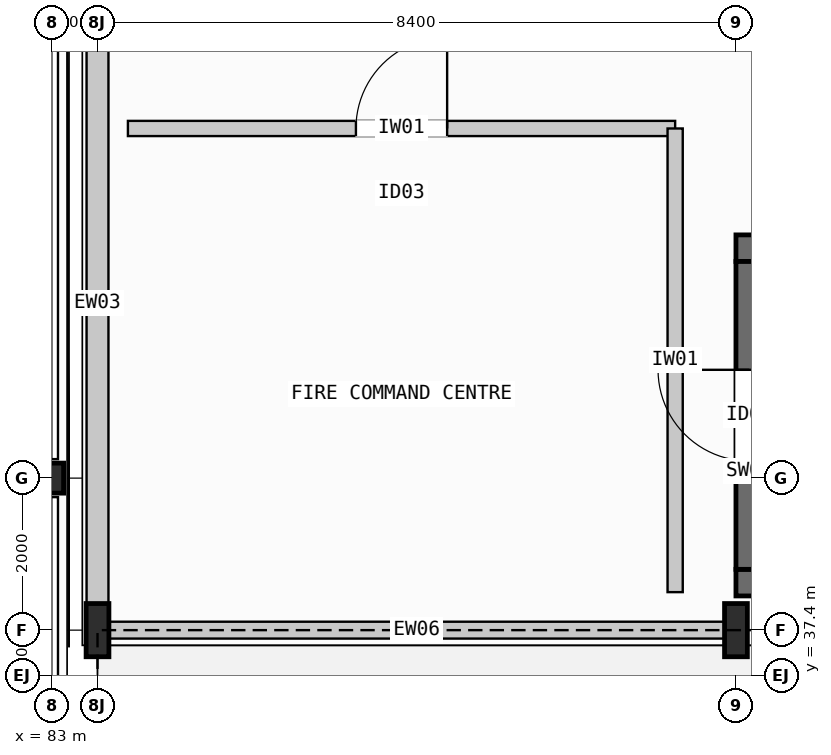
"""IFC4 building model, lengths in metres.
Left out: names, types, materials, properties, quantities, classifications, styles, units other than length and angle.
Written with IfcOpenShell. Run it as: python <this file> out.ifc"""

import sys

from ifc_helpers import new_model, si_unit, direction, frame, frame_2d, origin, origin_2d, place, context, subcontext, project, spatial, rectangle, i_section, extrude, element, fill, save


model = new_model("IFC4")
c1 = context("Model", 3, precision=1e-05, world=origin(), true_north=direction((0.0, 1.0)))
c2 = subcontext(c1, "Body", "Model", "MODEL_VIEW")
j1 = project(units=[si_unit("LENGTHUNIT", "METRE"), si_unit("PLANEANGLEUNIT", "RADIAN")], contexts=[c1])
p1 = place(None, origin())
s1 = spatial("IfcSite", under=j1, at=p1, CompositionType="ELEMENT")
p2 = place(p1, origin())
s2 = spatial("IfcBuilding", under=s1, at=p2, CompositionType="ELEMENT")
p3 = place(p2, origin())
s3 = spatial("IfcBuildingStorey", under=s2, at=p3, CompositionType="ELEMENT", Elevation=0.0)
p4 = place(p3, frame((83.0, 40.0, 0.0), z_axis=(0.0, 0.0, 1.0), x_axis=(1.0, 0.0, 0.0)))
e1 = element("IfcColumn", 1, at=p4, inside=s3, PredefinedType="COLUMN", context=c2, shape_type="SweptSolid", body=[
    extrude(i_section(OverallWidth=0.308, OverallDepth=0.395, WebThickness=0.021, FlangeThickness=0.04, FilletRadius=0.027, at=origin_2d()), origin(), (0.0, 0.0, 1.0), 6.0),
])
for number, where, z_axis, x_axis in (
    (2, (83.6, 38.0, 0.0), (0.0, 0.0, 1.0), (1.0, 0.0, 0.0)),
    (3, (92.0, 38.0, 0.0), (0.0, 0.0, 1.0), (1.0, 0.0, 0.0)),
):
    element("IfcColumn", number, at=place(p3, frame(where, z_axis=z_axis, x_axis=x_axis)), inside=s3, PredefinedType="COLUMN", context=c2, shape_type="SweptSolid", body=[
        extrude(i_section(OverallWidth=0.3, OverallDepth=0.7, WebThickness=0.017, FlangeThickness=0.032, FilletRadius=0.027, at=origin_2d()), origin(), (0.0, 0.0, 1.0), 6.0),
    ])
for number, where, z_axis, x_axis in (
    (4, (92.0, 38.625, 0.0), (0.0, 0.0, 1.0), (1.0, 0.0, 0.0)),
    (5, (92.0, 43.025, 0.0), (0.0, 0.0, 1.0), (1.0, 0.0, 0.0)),
):
    element("IfcWall", number, at=place(p3, frame(where, z_axis=z_axis, x_axis=x_axis)), inside=s3, PredefinedType="SHEAR", context=c2, shape_type="SweptSolid", body=[
        extrude(rectangle(XDim=9.1, YDim=0.35, at=frame_2d((4.55, 0.0))), origin(), (0.0, 0.0, 1.0), 6.0),
    ])
p5 = place(p3, frame((92.175, 38.8, 0.0), z_axis=(0.0, 0.0, 1.0), x_axis=(0.0, 1.0, 0.0)))
e6 = element("IfcWall", 6, at=p5, inside=s3, PredefinedType="SHEAR", context=c2, shape_type="SweptSolid", body=[
    extrude(rectangle(XDim=4.05, YDim=0.35, at=frame_2d((2.025, 0.0))), origin(), (0.0, 0.0, 1.0), 6.0),
])
p6 = place(p5, frame((1.425, 0.0, 0.0)))
e7 = element("IfcOpeningElement", 7, at=p6, cuts=e6, PredefinedType="OPENING", context=c2, shape_type="SweptSolid", body=[
    extrude(rectangle(XDim=1.2, YDim=2.2, at=frame_2d((0.6, 1.1))), frame((0.0, 0.185, 0.0), z_axis=(0.0, -1.0, 0.0), x_axis=(1.0, 0.0, 0.0)), (0.0, 0.0, 1.0), 0.37),
])
p7 = place(p3, frame((83.746, 38.0, 0.0), z_axis=(0.0, 0.0, 1.0), x_axis=(1.0, 0.0, 0.0)))
e8 = element("IfcWall", 8, at=p7, inside=s3, PredefinedType="STANDARD", context=c2, shape_type="SweptSolid", body=[
    extrude(rectangle(XDim=8.108, YDim=0.222, at=frame_2d((4.054, 0.0))), origin(), (0.0, 0.0, 1.0), 5.098),
])
p8 = place(p3, frame((83.6, 38.346, 0.0), z_axis=(0.0, 0.0, 1.0), x_axis=(0.0, 1.0, 0.0)))
e9 = element("IfcWall", 9, at=p8, inside=s3, PredefinedType="STANDARD", context=c2, shape_type="SweptSolid", body=[
    extrude(rectangle(XDim=7.908, YDim=0.288, at=frame_2d((3.954, 0.0))), origin(), (0.0, 0.0, 1.0), 5.1),
])
p9 = place(p3, frame((84.0, 44.6, 0.0), z_axis=(0.0, 0.0, 1.0), x_axis=(1.0, 0.0, 0.0)))
e10 = element("IfcWall", 10, at=p9, inside=s3, PredefinedType="PARTITIONING", context=c2, shape_type="SweptSolid", body=[
    extrude(rectangle(XDim=7.2, YDim=0.2, at=frame_2d((3.6, 0.0))), origin(), (0.0, 0.0, 1.0), 4.9),
])
p10 = place(p9, frame((3.0, 0.0, 0.0)))
e11 = element("IfcOpeningElement", 11, at=p10, cuts=e10, PredefinedType="OPENING", context=c2, shape_type="SweptSolid", body=[
    extrude(rectangle(XDim=1.2, YDim=2.2, at=frame_2d((0.6, 1.1))), frame((0.0, 0.11, 0.0), z_axis=(0.0, -1.0, 0.0), x_axis=(1.0, 0.0, 0.0)), (0.0, 0.0, 1.0), 0.22),
])
p11 = place(p3, frame((91.2, 38.5, 0.0), z_axis=(0.0, 0.0, 1.0), x_axis=(0.0, 1.0, 0.0)))
e12 = element("IfcWall", 12, at=p11, inside=s3, PredefinedType="PARTITIONING", context=c2, shape_type="SweptSolid", body=[
    extrude(rectangle(XDim=6.1, YDim=0.2, at=frame_2d((3.05, 0.0))), origin(), (0.0, 0.0, 1.0), 4.9),
])
p12 = place(p6, origin())
e13 = element("IfcDoor", 13, at=p12, inside=s3, OperationType="SINGLE_SWING_RIGHT", PredefinedType="DOOR", context=c2, shape_type="SweptSolid", body=[
    extrude(rectangle(XDim=1.2, YDim=2.2, at=frame_2d((0.6, 1.1))), frame((0.0, 0.025, 0.0), z_axis=(0.0, -1.0, 0.0), x_axis=(1.0, 0.0, 0.0)), (0.0, 0.0, 1.0), 0.05),
])
fill(e7, e13)
p13 = place(p10, origin())
e14 = element("IfcDoor", 14, at=p13, inside=s3, OperationType="SINGLE_SWING_RIGHT", PredefinedType="DOOR", context=c2, shape_type="SweptSolid", body=[
    extrude(rectangle(XDim=1.2, YDim=2.2, at=frame_2d((0.6, 1.1))), frame((0.0, 0.025, 0.0), z_axis=(0.0, -1.0, 0.0), x_axis=(1.0, 0.0, 0.0)), (0.0, 0.0, 1.0), 0.05),
])
fill(e11, e14)
save(model, sys.argv[1])
